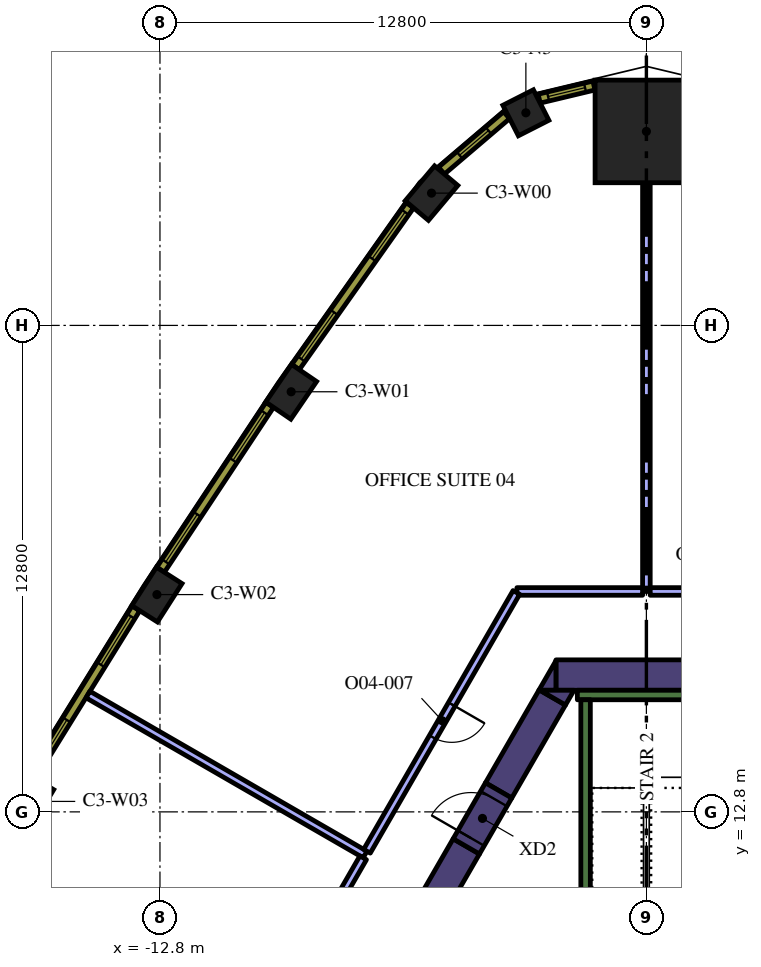
"""IFC4 building model, lengths in metres.
Left out: names, types, materials, properties, quantities, classifications, styles, units other than length and angle.
Written with IfcOpenShell. Run it as: python <this file> out.ifc"""

import sys

from ifc_helpers import new_model, si_unit, direction, frame, frame_2d, origin, origin_2d, place, context, subcontext, project, spatial, polyline, rectangle, outline, extrude, element, fill, save


model = new_model("IFC4")
c1 = context("Model", 3, precision=1e-05, world=origin(), true_north=direction((0.0, 1.0)))
c2 = subcontext(c1, "Body", "Model", "MODEL_VIEW")
j1 = project(units=[si_unit("LENGTHUNIT", "METRE"), si_unit("PLANEANGLEUNIT", "RADIAN")], contexts=[c1])
p1 = place(None, origin())
s1 = spatial("IfcSite", under=j1, at=p1, CompositionType="ELEMENT")
p2 = place(p1, origin())
s2 = spatial("IfcBuilding", under=s1, at=p2, CompositionType="ELEMENT")
p3 = place(p2, frame((0.0, 0.0, 187.8)))
s3 = spatial("IfcBuildingStorey", under=s2, at=p3, CompositionType="ELEMENT", Elevation=187.8)
p4 = place(p3, frame((0.0, 30.704, 0.0), z_axis=(0.0, 0.0, 1.0), x_axis=(0.0, 1.0, 0.0)))
e1 = element("IfcColumn", 1, at=p4, inside=s3, PredefinedType="COLUMN", context=c2, shape_type="SweptSolid", body=[
    extrude(rectangle(XDim=2.7, YDim=2.7, at=origin_2d()), origin(), (0.0, 0.0, 1.0), 4.2),
])
p5 = place(p3, frame((-3.171, 31.195, 0.0), z_axis=(0.0, 0.0, 1.0), x_axis=(-0.891486197647, -0.453047855535, 0.0)))
e2 = element("IfcColumn", 2, at=p5, inside=s3, PredefinedType="COLUMN", context=c2, shape_type="SweptSolid", body=[
    extrude(rectangle(XDim=0.9, YDim=0.9, at=origin_2d()), origin(), (0.0, 0.0, 1.0), 4.2),
])
for number, where, z_axis, x_axis in (
    (3, (-5.654, 29.081, 0.0), (0.0, 0.0, 1.0), (-0.644, -0.765, 0.0)),
    (4, (-9.348, 23.854, 0.0), (0.0, 0.0, 1.0), (-0.565, -0.825, 0.0)),
    (5, (-12.88, 18.517, 0.0), (0.0, 0.0, 1.0), (-0.539, -0.842, 0.0)),
    (6, (-16.247, 13.075, 0.0), (0.0, 0.0, 1.0), (-0.513, -0.858, 0.0)),
):
    element("IfcColumn", number, at=place(p3, frame(where, z_axis=z_axis, x_axis=x_axis)), inside=s3, PredefinedType="COLUMN", context=c2, shape_type="SweptSolid", body=[
        extrude(rectangle(XDim=1.2, YDim=0.8, at=origin_2d()), origin(), (0.0, 0.0, 1.0), 4.2),
    ])
p6 = place(p3, frame((-2.379, 16.4, 0.0), z_axis=(0.0, 0.0, 1.0), x_axis=(1.0, 0.0, 0.0)))
e7 = element("IfcWall", 7, at=p6, inside=s3, PredefinedType="SOLIDWALL", context=c2, shape_type="SweptSolid", body=[
    extrude(rectangle(XDim=3.824, YDim=0.8, at=frame_2d((1.912, 0.0))), origin(), (0.0, 0.0, 1.0), 4.2),
])
p7 = place(p3, origin())
e8 = element("IfcWall", 8, at=p7, inside=s3, PredefinedType="SOLIDWALL", context=c2, shape_type="SweptSolid", body=[
    extrude(outline(polyline([(-2.829, 16.0), (-2.381, 16.776), (-2.381, 16.0), (-2.829, 16.0)])), origin(), (0.0, 0.0, 1.0), 4.2),
])
p8 = place(p3, frame((-2.477, 15.81, 0.0), z_axis=(0.0, 0.0, 1.0), x_axis=(-0.499969377405, -0.866043083026, 0.0)))
e9 = element("IfcWall", 9, at=p8, inside=s3, PredefinedType="SOLIDWALL", context=c2, shape_type="SweptSolid", body=[
    extrude(rectangle(XDim=2.824, YDim=0.8, at=frame_2d((1.412, 0.0))), origin(), (0.0, 0.0, 1.0), 4.2),
])
e10 = element("IfcWall", 10, at=p7, inside=s3, PredefinedType="SOLIDWALL", context=c2, shape_type="SweptSolid", body=[
    extrude(outline(polyline([(-1.905, 16.0), (-2.129, 15.612), (-2.801, 16.0), (-1.905, 16.0)])), origin(), (0.0, 0.0, 1.0), 4.2),
])
p9 = place(p3, frame((-12.668, -1.842, 0.0), z_axis=(0.0, 0.0, 1.0), x_axis=(0.500003640647, 0.866023301845, 0.0)))
e11 = element("IfcWall", 11, at=p9, inside=s3, PredefinedType="SOLIDWALL", context=c2, shape_type="SweptSolid", body=[
    extrude(rectangle(XDim=15.858, YDim=0.8, at=frame_2d((7.929, 0.0))), origin(), (0.0, 0.0, 1.0), 4.2),
])
p10 = place(p3, frame((-1.817, 15.875, 0.0), z_axis=(0.0, 0.0, 1.0), x_axis=(1.0, 0.0, 0.0)))
e12 = element("IfcWall", 12, at=p10, inside=s3, PredefinedType="SOLIDWALL", context=c2, shape_type="SweptSolid", body=[
    extrude(rectangle(XDim=3.634, YDim=0.25, at=frame_2d((1.817, 0.0))), origin(), (0.0, 0.0, 1.0), 4.2),
])
p11 = place(p3, frame((-1.6, 8.7, 0.0), z_axis=(0.0, 0.0, 1.0), x_axis=(0.0, 1.0, 0.0)))
e13 = element("IfcWall", 13, at=p11, inside=s3, PredefinedType="SOLIDWALL", context=c2, shape_type="SweptSolid", body=[
    extrude(rectangle(XDim=7.05, YDim=0.25, at=frame_2d((3.525, 0.0))), origin(), (0.0, 0.0, 1.0), 4.2),
])
p12 = place(p3, frame((-4.739, 11.892, 0.0), z_axis=(0.0, 0.0, 1.0), x_axis=(0.500062241894, 0.865989465428, 0.0)))
e14 = element("IfcWall", 14, at=p12, inside=s3, PredefinedType="SOLIDWALL", context=c2, shape_type="SweptSolid", body=[
    extrude(rectangle(XDim=1.7, YDim=0.8, at=frame_2d((0.85, 0.0))), origin(), (0.0, 0.0, 1.0), 4.2),
])
p13 = place(p12, frame((0.25, 0.0, 0.0)))
e15 = element("IfcOpeningElement", 15, at=p13, cuts=e14, PredefinedType="OPENING", context=c2, shape_type="SweptSolid", body=[
    extrude(rectangle(XDim=1.2, YDim=2.1, at=frame_2d((0.6, 1.05))), frame((0.0, 0.41, 0.0), z_axis=(0.0, -1.0, 0.0), x_axis=(1.0, 0.0, 0.0)), (0.0, 0.0, 1.0), 0.82),
])
p14 = place(p3, frame((0.0, 18.6, 0.0), z_axis=(0.0, 0.0, 1.0), x_axis=(0.0, 1.0, 0.0)))
e16 = element("IfcWall", 16, at=p14, inside=s3, PredefinedType="PARTITIONING", context=c2, shape_type="SweptSolid", body=[
    extrude(rectangle(XDim=10.754, YDim=0.2, at=frame_2d((5.377, 0.0))), origin(), (0.0, 0.0, 1.0), 3.15),
])
p15 = place(p3, frame((3.274, 18.6, 0.0), z_axis=(0.0, 0.0, 1.0), x_axis=(-1.0, 0.0, 0.0)))
e17 = element("IfcWall", 17, at=p15, inside=s3, PredefinedType="PARTITIONING", context=c2, shape_type="SweptSolid", body=[
    extrude(rectangle(XDim=3.174, YDim=0.2, at=frame_2d((1.587, 0.0))), origin(), (0.0, 0.0, 1.0), 3.15),
])
p16 = place(p15, frame((1.1, 0.0, 0.0)))
e18 = element("IfcOpeningElement", 18, at=p16, cuts=e17, PredefinedType="OPENING", context=c2, shape_type="SweptSolid", body=[
    extrude(rectangle(XDim=1.0, YDim=2.1, at=frame_2d((0.5, 1.05))), frame((0.0, 0.11, 0.0), z_axis=(0.0, -1.0, 0.0), x_axis=(1.0, 0.0, 0.0)), (0.0, 0.0, 1.0), 0.22),
])
p17 = place(p3, frame((-7.403, 11.678, 0.0), z_axis=(0.0, 0.0, 1.0), x_axis=(-0.866029143232, 0.499993523031, 0.0)))
e19 = element("IfcWall", 19, at=p17, inside=s3, PredefinedType="PARTITIONING", context=c2, shape_type="SweptSolid", body=[
    extrude(rectangle(XDim=8.42, YDim=0.2, at=frame_2d((4.21, 0.0))), origin(), (0.0, 0.0, 1.0), 3.15),
])
p18 = place(p3, frame((-0.1, 18.6, 0.0), z_axis=(0.0, 0.0, 1.0), x_axis=(-1.0, 0.0, 0.0)))
e20 = element("IfcWall", 20, at=p18, inside=s3, PredefinedType="PARTITIONING", context=c2, shape_type="SweptSolid", body=[
    extrude(rectangle(XDim=3.306, YDim=0.2, at=frame_2d((1.653, 0.0))), origin(), (0.0, 0.0, 1.0), 3.15),
])
p19 = place(p3, frame((-3.421, 18.574, 0.0), z_axis=(0.0, 0.0, 1.0), x_axis=(-0.499989434416, -0.866031503741, 0.0)))
e21 = element("IfcWall", 21, at=p19, inside=s3, PredefinedType="PARTITIONING", context=c2, shape_type="SweptSolid", body=[
    extrude(rectangle(XDim=7.863, YDim=0.2, at=frame_2d((3.932, 0.0))), origin(), (0.0, 0.0, 1.0), 3.15),
])
p20 = place(p19, frame((3.4, 0.0, 0.0)))
e22 = element("IfcOpeningElement", 22, at=p20, cuts=e21, PredefinedType="OPENING", context=c2, shape_type="SweptSolid", body=[
    extrude(rectangle(XDim=1.0, YDim=2.1, at=frame_2d((0.5, 1.05))), frame((0.0, 0.11, 0.0), z_axis=(0.0, -1.0, 0.0), x_axis=(1.0, 0.0, 0.0)), (0.0, 0.0, 1.0), 0.22),
])
p21 = place(p3, frame((-7.453, 11.591, 0.0), z_axis=(0.0, 0.0, 1.0), x_axis=(-0.499980749935, -0.866036517529, 0.0)))
e23 = element("IfcWall", 23, at=p21, inside=s3, PredefinedType="PARTITIONING", context=c2, shape_type="SweptSolid", body=[
    extrude(rectangle(XDim=2.782, YDim=0.2, at=frame_2d((1.391, 0.0))), origin(), (0.0, 0.0, 1.0), 3.15),
])
p22 = place(p3, frame((-1.38, 31.912, 0.0), z_axis=(0.0, 0.0, 1.0), x_axis=(-0.972479955788, -0.232986556673, 0.0)))
e24 = element("IfcWall", 24, at=p22, inside=s3, PredefinedType="SOLIDWALL", context=c2, shape_type="SweptSolid", body=[
    extrude(rectangle(XDim=1.482, YDim=0.24, at=frame_2d((0.741, 0.0))), origin(), (0.0, 0.0, 1.0), 3.95),
])
p23 = place(p22, frame((0.241, 0.0, 0.9)))
e25 = element("IfcOpeningElement", 25, at=p23, cuts=e24, PredefinedType="OPENING", context=c2, shape_type="SweptSolid", body=[
    extrude(rectangle(XDim=1.0, YDim=2.55, at=frame_2d((0.5, 1.275))), frame((0.0, 0.13, 0.0), z_axis=(0.0, -1.0, 0.0), x_axis=(1.0, 0.0, 0.0)), (0.0, 0.0, 1.0), 0.26),
])
p24 = place(p3, frame((-3.678, 31.131, 0.0), z_axis=(0.0, 0.0, 1.0), x_axis=(-0.761419744247, -0.648259186645, 0.0)))
e26 = element("IfcWall", 26, at=p24, inside=s3, PredefinedType="SOLIDWALL", context=c2, shape_type="SweptSolid", body=[
    extrude(rectangle(XDim=2.25, YDim=0.24, at=frame_2d((1.125, 0.0))), origin(), (0.0, 0.0, 1.0), 3.95),
])
p25 = place(p24, frame((0.625, 0.0, 0.9)))
e27 = element("IfcOpeningElement", 27, at=p25, cuts=e26, PredefinedType="OPENING", context=c2, shape_type="SweptSolid", body=[
    extrude(rectangle(XDim=1.0, YDim=2.55, at=frame_2d((0.5, 1.275))), frame((0.0, 0.13, 0.0), z_axis=(0.0, -1.0, 0.0), x_axis=(1.0, 0.0, 0.0)), (0.0, 0.0, 1.0), 0.26),
])
p26 = place(p3, frame((-6.223, 28.762, 0.0), z_axis=(0.0, 0.0, 1.0), x_axis=(-0.577115207679, -0.816662743772, 0.0)))
e28 = element("IfcWall", 28, at=p26, inside=s3, PredefinedType="SOLIDWALL", context=c2, shape_type="SweptSolid", body=[
    extrude(rectangle(XDim=5.213, YDim=0.24, at=frame_2d((2.606, 0.0))), origin(), (0.0, 0.0, 1.0), 3.95),
])
p27 = place(p26, frame((0.221, 0.0, 0.9)))
e29 = element("IfcOpeningElement", 29, at=p27, cuts=e28, PredefinedType="OPENING", context=c2, shape_type="SweptSolid", body=[
    extrude(rectangle(XDim=1.5, YDim=2.55, at=frame_2d((0.75, 1.275))), frame((0.0, 0.13, 0.0), z_axis=(0.0, -1.0, 0.0), x_axis=(1.0, 0.0, 0.0)), (0.0, 0.0, 1.0), 0.26),
])
p28 = place(p26, frame((3.452, 0.0, 0.9)))
e30 = element("IfcOpeningElement", 30, at=p28, cuts=e28, PredefinedType="OPENING", context=c2, shape_type="SweptSolid", body=[
    extrude(rectangle(XDim=1.5, YDim=2.55, at=frame_2d((0.75, 1.275))), frame((0.0, 0.13, 0.0), z_axis=(0.0, -1.0, 0.0), x_axis=(1.0, 0.0, 0.0)), (0.0, 0.0, 1.0), 0.26),
])
p29 = place(p3, frame((-9.911, 23.51, 0.0), z_axis=(0.0, 0.0, 1.0), x_axis=(-0.551892811511, -0.833915058386, 0.0)))
e31 = element("IfcWall", 31, at=p29, inside=s3, PredefinedType="SOLIDWALL", context=c2, shape_type="SweptSolid", body=[
    extrude(rectangle(XDim=5.204, YDim=0.24, at=frame_2d((2.602, 0.0))), origin(), (0.0, 0.0, 1.0), 3.95),
])
p30 = place(p29, frame((0.248, 0.0, 0.9)))
e32 = element("IfcOpeningElement", 32, at=p30, cuts=e31, PredefinedType="OPENING", context=c2, shape_type="SweptSolid", body=[
    extrude(rectangle(XDim=1.5, YDim=2.55, at=frame_2d((0.75, 1.275))), frame((0.0, 0.13, 0.0), z_axis=(0.0, -1.0, 0.0), x_axis=(1.0, 0.0, 0.0)), (0.0, 0.0, 1.0), 0.26),
])
p31 = place(p29, frame((3.455, 0.0, 0.9)))
e33 = element("IfcOpeningElement", 33, at=p31, cuts=e31, PredefinedType="OPENING", context=c2, shape_type="SweptSolid", body=[
    extrude(rectangle(XDim=1.5, YDim=2.55, at=frame_2d((0.75, 1.275))), frame((0.0, 0.13, 0.0), z_axis=(0.0, -1.0, 0.0), x_axis=(1.0, 0.0, 0.0)), (0.0, 0.0, 1.0), 0.26),
])
p32 = place(p3, frame((-13.433, 18.156, 0.0), z_axis=(0.0, 0.0, 1.0), x_axis=(-0.526197926587, -0.850362124072, 0.0)))
e34 = element("IfcWall", 34, at=p32, inside=s3, PredefinedType="SOLIDWALL", context=c2, shape_type="SweptSolid", body=[
    extrude(rectangle(XDim=5.203, YDim=0.24, at=frame_2d((2.602, 0.0))), origin(), (0.0, 0.0, 1.0), 3.95),
])
p33 = place(p32, frame((0.248, 0.0, 0.9)))
e35 = element("IfcOpeningElement", 35, at=p33, cuts=e34, PredefinedType="OPENING", context=c2, shape_type="SweptSolid", body=[
    extrude(rectangle(XDim=1.5, YDim=2.55, at=frame_2d((0.75, 1.275))), frame((0.0, 0.13, 0.0), z_axis=(0.0, -1.0, 0.0), x_axis=(1.0, 0.0, 0.0)), (0.0, 0.0, 1.0), 0.26),
])
p34 = place(p32, frame((3.455, 0.0, 0.9)))
e36 = element("IfcOpeningElement", 36, at=p34, cuts=e34, PredefinedType="OPENING", context=c2, shape_type="SweptSolid", body=[
    extrude(rectangle(XDim=1.5, YDim=2.55, at=frame_2d((0.75, 1.275))), frame((0.0, 0.13, 0.0), z_axis=(0.0, -1.0, 0.0), x_axis=(1.0, 0.0, 0.0)), (0.0, 0.0, 1.0), 0.26),
])
p35 = place(p13, origin())
e37 = element("IfcDoor", 37, at=p35, inside=s3, OperationType="SINGLE_SWING_LEFT", PredefinedType="DOOR", context=c2, shape_type="SweptSolid", body=[
    extrude(rectangle(XDim=1.2, YDim=2.1, at=frame_2d((0.6, 1.05))), frame((0.0, 0.025, 0.0), z_axis=(0.0, -1.0, 0.0), x_axis=(1.0, 0.0, 0.0)), (0.0, 0.0, 1.0), 0.05),
])
fill(e15, e37)
p36 = place(p20, origin())
e38 = element("IfcDoor", 38, at=p36, inside=s3, OperationType="SINGLE_SWING_LEFT", PredefinedType="DOOR", context=c2, shape_type="SweptSolid", body=[
    extrude(rectangle(XDim=1.0, YDim=2.1, at=frame_2d((0.5, 1.05))), frame((0.0, 0.025, 0.0), z_axis=(0.0, -1.0, 0.0), x_axis=(1.0, 0.0, 0.0)), (0.0, 0.0, 1.0), 0.05),
])
fill(e22, e38)
p37 = place(p23, origin())
e39 = element("IfcWindow", 39, at=p37, inside=s3, PartitioningType="SINGLE_PANEL", PredefinedType="WINDOW", context=c2, shape_type="SweptSolid", body=[
    extrude(rectangle(XDim=1.0, YDim=2.55, at=frame_2d((0.5, 1.275))), frame((0.0, 0.04, 0.0), z_axis=(0.0, -1.0, 0.0), x_axis=(1.0, 0.0, 0.0)), (0.0, 0.0, 1.0), 0.06),
])
fill(e25, e39)
p38 = place(p25, origin())
e40 = element("IfcWindow", 40, at=p38, inside=s3, PartitioningType="SINGLE_PANEL", PredefinedType="WINDOW", context=c2, shape_type="SweptSolid", body=[
    extrude(rectangle(XDim=1.0, YDim=2.55, at=frame_2d((0.5, 1.275))), frame((0.0, 0.04, 0.0), z_axis=(0.0, -1.0, 0.0), x_axis=(1.0, 0.0, 0.0)), (0.0, 0.0, 1.0), 0.06),
])
fill(e27, e40)
p39 = place(p27, origin())
e41 = element("IfcWindow", 41, at=p39, inside=s3, PartitioningType="SINGLE_PANEL", PredefinedType="WINDOW", context=c2, shape_type="SweptSolid", body=[
    extrude(rectangle(XDim=1.5, YDim=2.55, at=frame_2d((0.75, 1.275))), frame((0.0, 0.04, 0.0), z_axis=(0.0, -1.0, 0.0), x_axis=(1.0, 0.0, 0.0)), (0.0, 0.0, 1.0), 0.06),
])
fill(e29, e41)
p40 = place(p28, origin())
e42 = element("IfcWindow", 42, at=p40, inside=s3, PartitioningType="SINGLE_PANEL", PredefinedType="WINDOW", context=c2, shape_type="SweptSolid", body=[
    extrude(rectangle(XDim=1.5, YDim=2.55, at=frame_2d((0.75, 1.275))), frame((0.0, 0.04, 0.0), z_axis=(0.0, -1.0, 0.0), x_axis=(1.0, 0.0, 0.0)), (0.0, 0.0, 1.0), 0.06),
])
fill(e30, e42)
p41 = place(p30, origin())
e43 = element("IfcWindow", 43, at=p41, inside=s3, PartitioningType="SINGLE_PANEL", PredefinedType="WINDOW", context=c2, shape_type="SweptSolid", body=[
    extrude(rectangle(XDim=1.5, YDim=2.55, at=frame_2d((0.75, 1.275))), frame((0.0, 0.04, 0.0), z_axis=(0.0, -1.0, 0.0), x_axis=(1.0, 0.0, 0.0)), (0.0, 0.0, 1.0), 0.06),
])
fill(e32, e43)
p42 = place(p31, origin())
e44 = element("IfcWindow", 44, at=p42, inside=s3, PartitioningType="SINGLE_PANEL", PredefinedType="WINDOW", context=c2, shape_type="SweptSolid", body=[
    extrude(rectangle(XDim=1.5, YDim=2.55, at=frame_2d((0.75, 1.275))), frame((0.0, 0.04, 0.0), z_axis=(0.0, -1.0, 0.0), x_axis=(1.0, 0.0, 0.0)), (0.0, 0.0, 1.0), 0.06),
])
fill(e33, e44)
p43 = place(p33, origin())
e45 = element("IfcWindow", 45, at=p43, inside=s3, PartitioningType="SINGLE_PANEL", PredefinedType="WINDOW", context=c2, shape_type="SweptSolid", body=[
    extrude(rectangle(XDim=1.5, YDim=2.55, at=frame_2d((0.75, 1.275))), frame((0.0, 0.04, 0.0), z_axis=(0.0, -1.0, 0.0), x_axis=(1.0, 0.0, 0.0)), (0.0, 0.0, 1.0), 0.06),
])
fill(e35, e45)
p44 = place(p34, origin())
e46 = element("IfcWindow", 46, at=p44, inside=s3, PartitioningType="SINGLE_PANEL", PredefinedType="WINDOW", context=c2, shape_type="SweptSolid", body=[
    extrude(rectangle(XDim=1.5, YDim=2.55, at=frame_2d((0.75, 1.275))), frame((0.0, 0.04, 0.0), z_axis=(0.0, -1.0, 0.0), x_axis=(1.0, 0.0, 0.0)), (0.0, 0.0, 1.0), 0.06),
])
fill(e36, e46)
save(model, sys.argv[1])
